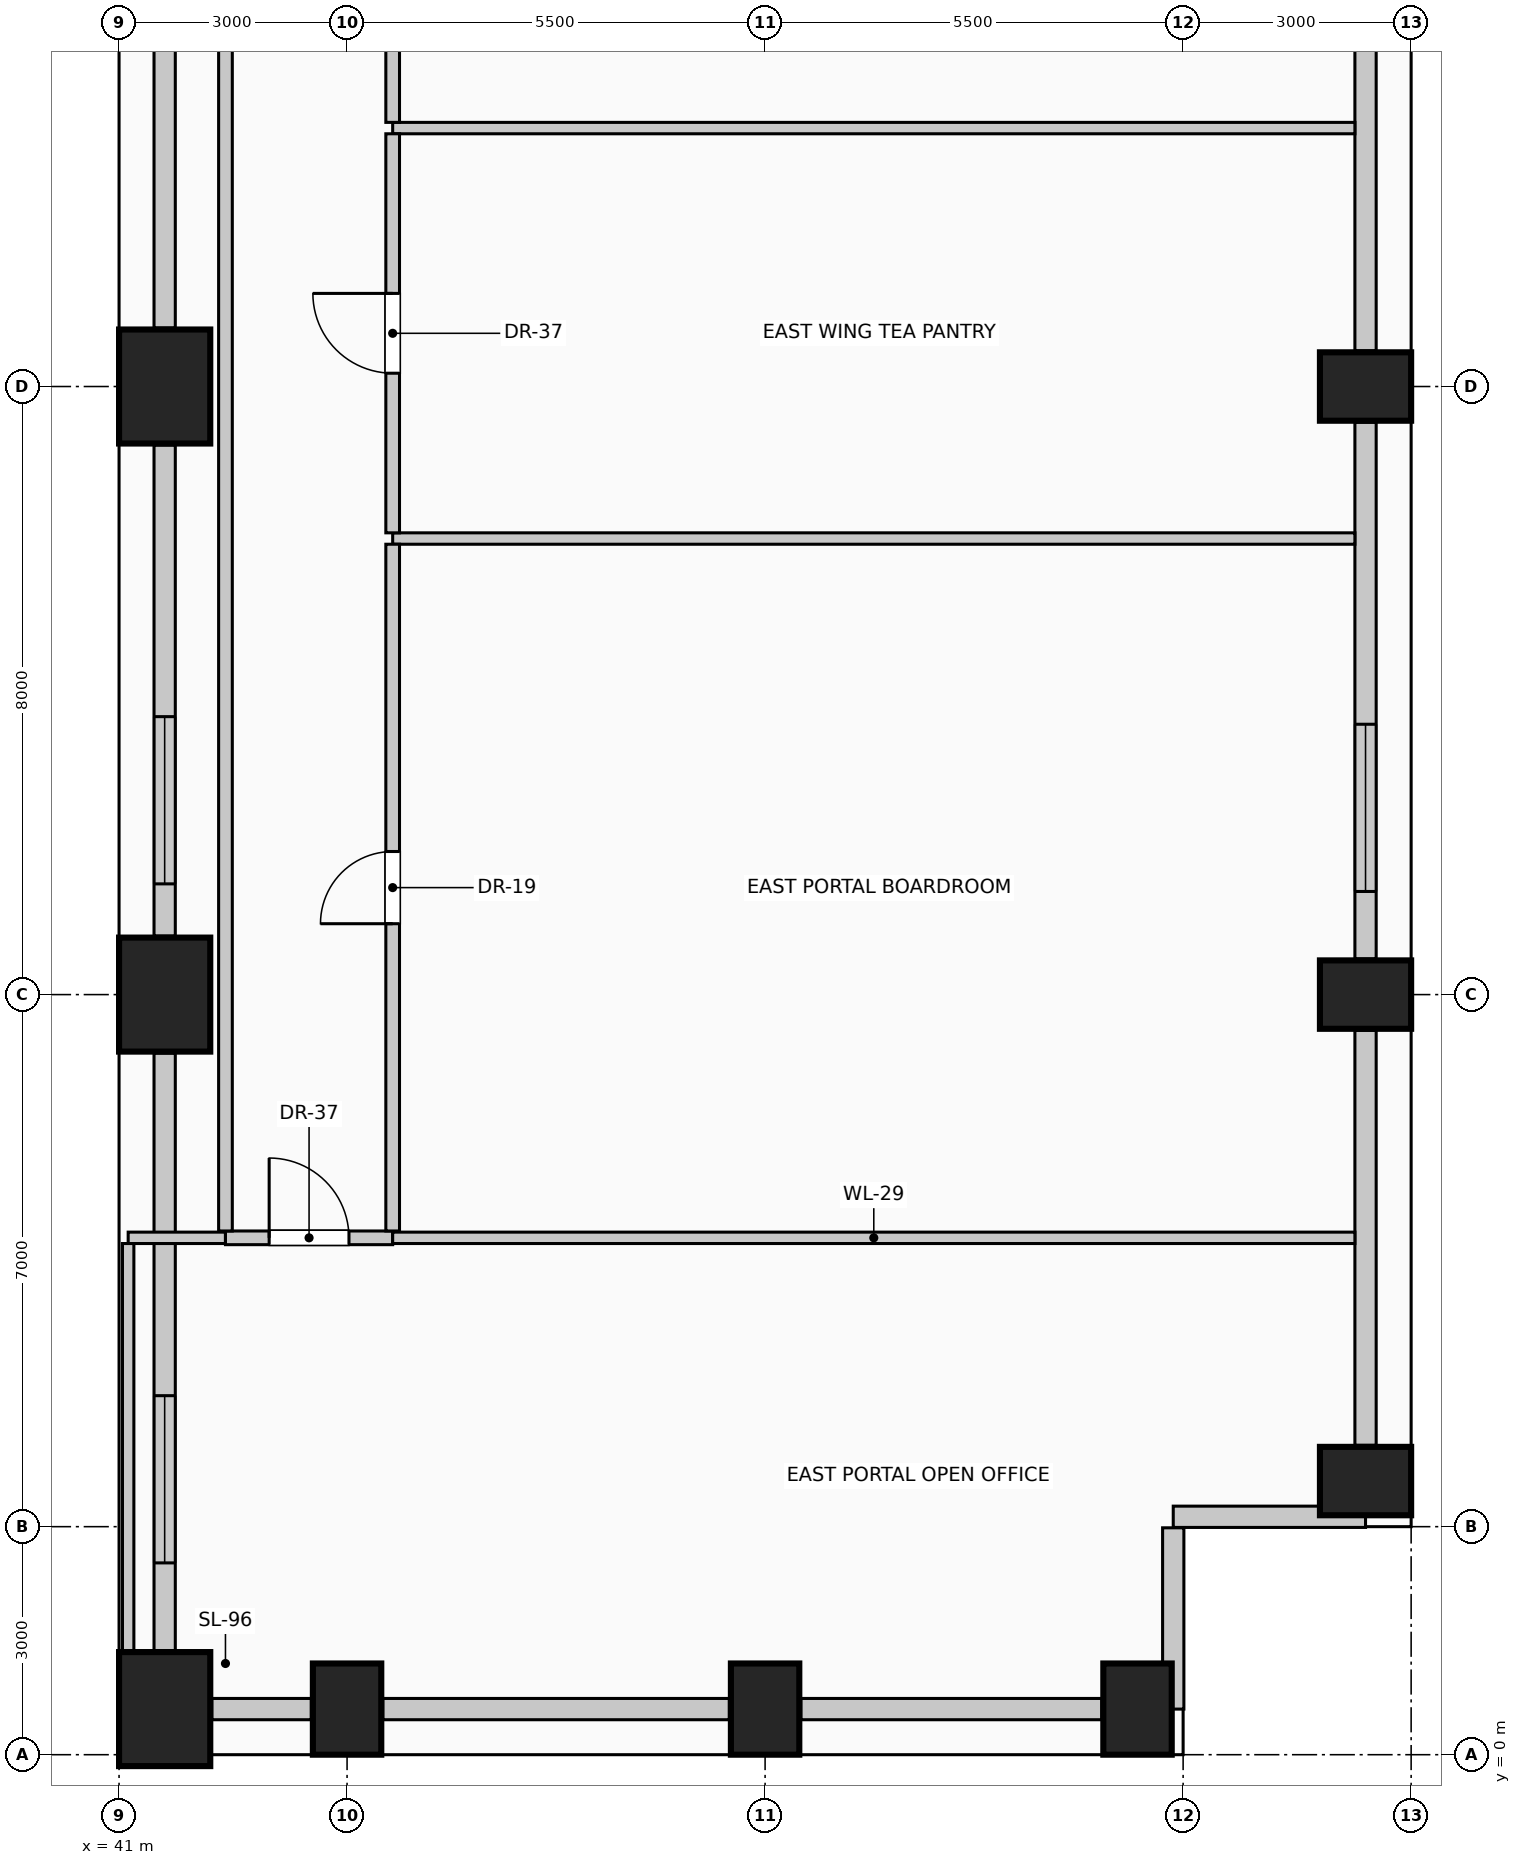
"""IFC4 building model, lengths in metres.
Left out: names, types, materials, properties, quantities, classifications, styles, units other than length and angle.
Written with IfcOpenShell. Run it as: python <this file> out.ifc"""

import sys

from ifc_helpers import new_model, si_unit, direction, frame, frame_2d, origin, origin_2d, place, context, subcontext, project, spatial, rectangle, extrude, element, fill, save


model = new_model("IFC4")
c1 = context("Model", 3, precision=1e-05, world=origin(), true_north=direction((0.0, 1.0)))
c2 = subcontext(c1, "Body", "Model", "MODEL_VIEW")
j1 = project(units=[si_unit("LENGTHUNIT", "METRE"), si_unit("PLANEANGLEUNIT", "RADIAN")], contexts=[c1])
p1 = place(None, origin())
s1 = spatial("IfcSite", under=j1, at=p1, CompositionType="ELEMENT")
p2 = place(p1, origin())
s2 = spatial("IfcBuilding", under=s1, at=p2, CompositionType="ELEMENT")
p3 = place(p2, frame((0.0, 0.0, 26.6)))
s3 = spatial("IfcBuildingStorey", under=s2, at=p3, CompositionType="ELEMENT", Elevation=26.6)
p4 = place(p3, frame((41.6, 0.6, 0.0), z_axis=(0.0, 0.0, 1.0), x_axis=(1.0, 0.0, 0.0)))
e1 = element("IfcColumn", 1, at=p4, inside=s3, PredefinedType="COLUMN", context=c2, shape_type="SweptSolid", body=[
    extrude(rectangle(XDim=1.2, YDim=1.5, at=origin_2d()), origin(), (0.0, 0.0, 1.0), 4.0),
])
for number, where, z_axis, x_axis in (
    (2, (44.0, 0.6, 0.0), (0.0, 0.0, 1.0), (1.0, 0.0, 0.0)),
    (3, (49.5, 0.6, 0.0), (0.0, 0.0, 1.0), (1.0, 0.0, 0.0)),
    (4, (54.4, 0.6, 0.0), (0.0, 0.0, 1.0), (1.0, 0.0, 0.0)),
    (5, (57.4, 3.6, 0.0), (0.0, 0.0, 1.0), (0.0, 1.0, 0.0)),
    (6, (57.4, 10.0, 0.0), (0.0, 0.0, 1.0), (0.0, 1.0, 0.0)),
    (7, (57.4, 18.0, 0.0), (0.0, 0.0, 1.0), (0.0, 1.0, 0.0)),
):
    element("IfcColumn", number, at=place(p3, frame(where, z_axis=z_axis, x_axis=x_axis)), inside=s3, PredefinedType="COLUMN", context=c2, shape_type="SweptSolid", body=[
        extrude(rectangle(XDim=0.9, YDim=1.2, at=origin_2d()), origin(), (0.0, 0.0, 1.0), 4.0),
    ])
for number, where, z_axis, x_axis in (
    (8, (41.6, 10.0, 0.0), (0.0, 0.0, 1.0), (1.0, 0.0, 0.0)),
    (9, (41.6, 18.0, 0.0), (0.0, 0.0, 1.0), (1.0, 0.0, 0.0)),
):
    element("IfcColumn", number, at=place(p3, frame(where, z_axis=z_axis, x_axis=x_axis)), inside=s3, PredefinedType="COLUMN", context=c2, shape_type="SweptSolid", body=[
        extrude(rectangle(XDim=1.2, YDim=1.5, at=origin_2d()), origin(), (0.0, 0.0, 1.0), 4.0),
    ])
p5 = place(p3, frame((43.53, 0.6, 0.0), z_axis=(0.0, 0.0, 1.0), x_axis=(-1.0, 0.0, 0.0)))
e10 = element("IfcWall", 10, at=p5, inside=s3, PredefinedType="SOLIDWALL", context=c2, shape_type="SweptSolid", body=[
    extrude(rectangle(XDim=1.31, YDim=0.28, at=frame_2d((0.655, 0.0))), origin(), (0.0, 0.0, 1.0), 2.85),
])
p6 = place(p3, frame((49.03, 0.6, 0.0), z_axis=(0.0, 0.0, 1.0), x_axis=(-1.0, 0.0, 0.0)))
e11 = element("IfcWall", 11, at=p6, inside=s3, PredefinedType="SOLIDWALL", context=c2, shape_type="SweptSolid", body=[
    extrude(rectangle(XDim=4.56, YDim=0.28, at=frame_2d((2.28, 0.0))), origin(), (0.0, 0.0, 1.0), 2.85),
])
p7 = place(p3, frame((53.93, 0.6, 0.0), z_axis=(0.0, 0.0, 1.0), x_axis=(-1.0, 0.0, 0.0)))
e12 = element("IfcWall", 12, at=p7, inside=s3, PredefinedType="SOLIDWALL", context=c2, shape_type="SweptSolid", body=[
    extrude(rectangle(XDim=3.96, YDim=0.28, at=frame_2d((1.98, 0.0))), origin(), (0.0, 0.0, 1.0), 2.85),
])
p8 = place(p3, frame((57.4, 9.53, 0.0), z_axis=(0.0, 0.0, 1.0), x_axis=(0.0, -1.0, 0.0)))
e13 = element("IfcWall", 13, at=p8, inside=s3, PredefinedType="SOLIDWALL", context=c2, shape_type="SweptSolid", body=[
    extrude(rectangle(XDim=5.46, YDim=0.28, at=frame_2d((2.73, 0.0))), origin(), (0.0, 0.0, 1.0), 2.85),
])
p9 = place(p3, frame((57.4, 17.53, 0.0), z_axis=(0.0, 0.0, 1.0), x_axis=(0.0, -1.0, 0.0)))
e14 = element("IfcWall", 14, at=p9, inside=s3, PredefinedType="SOLIDWALL", context=c2, shape_type="SweptSolid", body=[
    extrude(rectangle(XDim=7.06, YDim=0.28, at=frame_2d((3.53, 0.0))), origin(), (0.0, 0.0, 1.0), 2.85),
])
p10 = place(p9, frame((3.973, 0.0, 0.42)))
e15 = element("IfcOpeningElement", 15, at=p10, cuts=e14, PredefinedType="OPENING", context=c2, shape_type="SweptSolid", body=[
    extrude(rectangle(XDim=2.2, YDim=1.95, at=frame_2d((1.1, 0.975))), frame((0.0, 0.15, 0.0), z_axis=(0.0, -1.0, 0.0), x_axis=(1.0, 0.0, 0.0)), (0.0, 0.0, 1.0), 0.3),
])
p11 = place(p3, frame((57.4, 25.53, 0.0), z_axis=(0.0, 0.0, 1.0), x_axis=(0.0, -1.0, 0.0)))
e16 = element("IfcWall", 16, at=p11, inside=s3, PredefinedType="SOLIDWALL", context=c2, shape_type="SweptSolid", body=[
    extrude(rectangle(XDim=7.06, YDim=0.28, at=frame_2d((3.53, 0.0))), origin(), (0.0, 0.0, 1.0), 2.85),
])
p12 = place(p3, frame((57.4, 3.13, 0.0), z_axis=(0.0, 0.0, 1.0), x_axis=(-1.0, 0.0, 0.0)))
e17 = element("IfcWall", 17, at=p12, inside=s3, PredefinedType="SOLIDWALL", context=c2, shape_type="SweptSolid", body=[
    extrude(rectangle(XDim=2.53, YDim=0.28, at=frame_2d((1.265, 0.0))), origin(), (0.0, 0.0, 1.0), 3.7),
])
p13 = place(p3, frame((54.87, 2.985, 0.0), z_axis=(0.0, 0.0, 1.0), x_axis=(0.0, -1.0, 0.0)))
e18 = element("IfcWall", 18, at=p13, inside=s3, PredefinedType="SOLIDWALL", context=c2, shape_type="SweptSolid", body=[
    extrude(rectangle(XDim=2.385, YDim=0.28, at=frame_2d((1.192, 0.0))), origin(), (0.0, 0.0, 1.0), 3.7),
])
p14 = place(p3, frame((41.6, 1.37, 0.0), z_axis=(0.0, 0.0, 1.0), x_axis=(0.0, 1.0, 0.0)))
e19 = element("IfcWall", 19, at=p14, inside=s3, PredefinedType="SOLIDWALL", context=c2, shape_type="SweptSolid", body=[
    extrude(rectangle(XDim=7.86, YDim=0.28, at=frame_2d((3.93, 0.0))), origin(), (0.0, 0.0, 1.0), 3.0),
])
p15 = place(p14, frame((1.153, 0.0, 0.42)))
e20 = element("IfcOpeningElement", 20, at=p15, cuts=e19, PredefinedType="OPENING", context=c2, shape_type="SweptSolid", body=[
    extrude(rectangle(XDim=2.2, YDim=1.95, at=frame_2d((1.1, 0.975))), frame((0.0, 0.15, 0.0), z_axis=(0.0, -1.0, 0.0), x_axis=(1.0, 0.0, 0.0)), (0.0, 0.0, 1.0), 0.3),
])
p16 = place(p3, frame((41.6, 10.77, 0.0), z_axis=(0.0, 0.0, 1.0), x_axis=(0.0, 1.0, 0.0)))
e21 = element("IfcWall", 21, at=p16, inside=s3, PredefinedType="SOLIDWALL", context=c2, shape_type="SweptSolid", body=[
    extrude(rectangle(XDim=6.46, YDim=0.28, at=frame_2d((3.23, 0.0))), origin(), (0.0, 0.0, 1.0), 3.0),
])
p17 = place(p16, frame((0.687, 0.0, 0.42)))
e22 = element("IfcOpeningElement", 22, at=p17, cuts=e21, PredefinedType="OPENING", context=c2, shape_type="SweptSolid", body=[
    extrude(rectangle(XDim=2.2, YDim=1.95, at=frame_2d((1.1, 0.975))), frame((0.0, 0.15, 0.0), z_axis=(0.0, -1.0, 0.0), x_axis=(1.0, 0.0, 0.0)), (0.0, 0.0, 1.0), 0.3),
])
p18 = place(p3, frame((41.6, 18.77, 0.0), z_axis=(0.0, 0.0, 1.0), x_axis=(0.0, 1.0, 0.0)))
e23 = element("IfcWall", 23, at=p18, inside=s3, PredefinedType="SOLIDWALL", context=c2, shape_type="SweptSolid", body=[
    extrude(rectangle(XDim=6.46, YDim=0.28, at=frame_2d((3.23, 0.0))), origin(), (0.0, 0.0, 1.0), 3.0),
])
p19 = place(p3, frame((41.12, 6.8, 0.0), z_axis=(0.0, 0.0, 1.0), x_axis=(1.0, 0.0, 0.0)))
e24 = element("IfcWall", 24, at=p19, inside=s3, PredefinedType="PARTITIONING", context=c2, shape_type="SweptSolid", body=[
    extrude(rectangle(XDim=1.28, YDim=0.15, at=frame_2d((0.64, 0.0))), origin(), (0.0, 0.0, 1.0), 3.095),
])
p20 = place(p3, frame((42.4, 6.8, 0.0), z_axis=(0.0, 0.0, 1.0), x_axis=(1.0, 0.0, 0.0)))
e25 = element("IfcWall", 25, at=p20, inside=s3, PredefinedType="PARTITIONING", context=c2, shape_type="SweptSolid", body=[
    extrude(rectangle(XDim=2.2, YDim=0.18, at=frame_2d((1.1, 0.0))), origin(), (0.0, 0.0, 1.0), 3.095),
])
p21 = place(p20, frame((0.575, 0.0, 0.0)))
e26 = element("IfcOpeningElement", 26, at=p21, cuts=e25, PredefinedType="OPENING", context=c2, shape_type="SweptSolid", body=[
    extrude(rectangle(XDim=1.05, YDim=2.15, at=frame_2d((0.525, 1.075))), frame((0.0, 0.1, 0.0), z_axis=(0.0, -1.0, 0.0), x_axis=(1.0, 0.0, 0.0)), (0.0, 0.0, 1.0), 0.2),
])
p22 = place(p3, frame((44.6, 6.8, 0.0), z_axis=(0.0, 0.0, 1.0), x_axis=(1.0, 0.0, 0.0)))
e27 = element("IfcWall", 27, at=p22, inside=s3, PredefinedType="PARTITIONING", context=c2, shape_type="SweptSolid", body=[
    extrude(rectangle(XDim=12.66, YDim=0.15, at=frame_2d((6.33, 0.0))), origin(), (0.0, 0.0, 1.0), 3.095),
])
for number, where, z_axis, x_axis in (
    (28, (44.6, 16.0, 0.0), (0.0, 0.0, 1.0), (1.0, 0.0, 0.0)),
    (29, (44.6, 21.4, 0.0), (0.0, 0.0, 1.0), (1.0, 0.0, 0.0)),
):
    element("IfcWall", number, at=place(p3, frame(where, z_axis=z_axis, x_axis=x_axis)), inside=s3, PredefinedType="PARTITIONING", context=c2, shape_type="SweptSolid", body=[
        extrude(rectangle(XDim=12.66, YDim=0.15, at=frame_2d((6.33, 0.0))), origin(), (0.0, 0.0, 1.0), 3.7),
    ])
p23 = place(p3, frame((41.12, 1.35, 0.0), z_axis=(0.0, 0.0, 1.0), x_axis=(0.0, 1.0, 0.0)))
e30 = element("IfcWall", 30, at=p23, inside=s3, PredefinedType="PARTITIONING", context=c2, shape_type="SweptSolid", body=[
    extrude(rectangle(XDim=5.375, YDim=0.15, at=frame_2d((2.688, 0.0))), origin(), (0.0, 0.0, 1.0), 3.7),
])
p24 = place(p3, frame((42.4, 6.89, 0.0), z_axis=(0.0, 0.0, 1.0), x_axis=(0.0, 1.0, 0.0)))
e31 = element("IfcWall", 31, at=p24, inside=s3, PredefinedType="PARTITIONING", context=c2, shape_type="SweptSolid", body=[
    extrude(rectangle(XDim=25.385, YDim=0.18, at=frame_2d((12.692, 0.0))), origin(), (0.0, 0.0, 1.0), 3.7),
])
p25 = place(p3, frame((44.6, 6.89, 0.0), z_axis=(0.0, 0.0, 1.0), x_axis=(0.0, 1.0, 0.0)))
e32 = element("IfcWall", 32, at=p25, inside=s3, PredefinedType="PARTITIONING", context=c2, shape_type="SweptSolid", body=[
    extrude(rectangle(XDim=9.035, YDim=0.18, at=frame_2d((4.518, 0.0))), origin(), (0.0, 0.0, 1.0), 3.7),
])
p26 = place(p25, frame((4.042, 0.0, 0.0)))
e33 = element("IfcOpeningElement", 33, at=p26, cuts=e32, PredefinedType="OPENING", context=c2, shape_type="SweptSolid", body=[
    extrude(rectangle(XDim=0.95, YDim=2.15, at=frame_2d((0.475, 1.075))), frame((0.0, 0.1, 0.0), z_axis=(0.0, -1.0, 0.0), x_axis=(1.0, 0.0, 0.0)), (0.0, 0.0, 1.0), 0.2),
])
p27 = place(p3, frame((44.6, 16.075, 0.0), z_axis=(0.0, 0.0, 1.0), x_axis=(0.0, 1.0, 0.0)))
e34 = element("IfcWall", 34, at=p27, inside=s3, PredefinedType="PARTITIONING", context=c2, shape_type="SweptSolid", body=[
    extrude(rectangle(XDim=5.25, YDim=0.18, at=frame_2d((2.625, 0.0))), origin(), (0.0, 0.0, 1.0), 3.7),
])
p28 = place(p27, frame((2.1, 0.0, 0.0)))
e35 = element("IfcOpeningElement", 35, at=p28, cuts=e34, PredefinedType="OPENING", context=c2, shape_type="SweptSolid", body=[
    extrude(rectangle(XDim=1.05, YDim=2.15, at=frame_2d((0.525, 1.075))), frame((0.0, 0.1, 0.0), z_axis=(0.0, -1.0, 0.0), x_axis=(1.0, 0.0, 0.0)), (0.0, 0.0, 1.0), 0.2),
])
p29 = place(p3, frame((44.6, 21.475, 0.0), z_axis=(0.0, 0.0, 1.0), x_axis=(0.0, 1.0, 0.0)))
e36 = element("IfcWall", 36, at=p29, inside=s3, PredefinedType="PARTITIONING", context=c2, shape_type="SweptSolid", body=[
    extrude(rectangle(XDim=5.25, YDim=0.18, at=frame_2d((2.625, 0.0))), origin(), (0.0, 0.0, 1.0), 3.7),
])
p30 = place(p29, frame((2.15, 0.0, 0.0)))
e37 = element("IfcOpeningElement", 37, at=p30, cuts=e36, PredefinedType="OPENING", context=c2, shape_type="SweptSolid", body=[
    extrude(rectangle(XDim=0.95, YDim=2.15, at=frame_2d((0.475, 1.075))), frame((0.0, 0.1, 0.0), z_axis=(0.0, -1.0, 0.0), x_axis=(1.0, 0.0, 0.0)), (0.0, 0.0, 1.0), 0.2),
])
p31 = place(p10, origin())
e38 = element("IfcWindow", 38, at=p31, inside=s3, PartitioningType="SINGLE_PANEL", PredefinedType="WINDOW", context=c2, shape_type="SweptSolid", body=[
    extrude(rectangle(XDim=2.2, YDim=1.95, at=frame_2d((1.1, 0.975))), frame((0.0, 0.03, 0.0), z_axis=(0.0, -1.0, 0.0), x_axis=(1.0, 0.0, 0.0)), (0.0, 0.0, 1.0), 0.06),
])
fill(e15, e38)
p32 = place(p15, origin())
e39 = element("IfcWindow", 39, at=p32, inside=s3, PartitioningType="SINGLE_PANEL", PredefinedType="WINDOW", context=c2, shape_type="SweptSolid", body=[
    extrude(rectangle(XDim=2.2, YDim=1.95, at=frame_2d((1.1, 0.975))), frame((0.0, 0.03, 0.0), z_axis=(0.0, -1.0, 0.0), x_axis=(1.0, 0.0, 0.0)), (0.0, 0.0, 1.0), 0.06),
])
fill(e20, e39)
p33 = place(p17, origin())
e40 = element("IfcWindow", 40, at=p33, inside=s3, PartitioningType="SINGLE_PANEL", PredefinedType="WINDOW", context=c2, shape_type="SweptSolid", body=[
    extrude(rectangle(XDim=2.2, YDim=1.95, at=frame_2d((1.1, 0.975))), frame((0.0, 0.03, 0.0), z_axis=(0.0, -1.0, 0.0), x_axis=(1.0, 0.0, 0.0)), (0.0, 0.0, 1.0), 0.06),
])
fill(e22, e40)
p34 = place(p21, origin())
e41 = element("IfcDoor", 41, at=p34, inside=s3, OperationType="SINGLE_SWING_LEFT", PredefinedType="DOOR", context=c2, shape_type="SweptSolid", body=[
    extrude(rectangle(XDim=1.05, YDim=2.15, at=frame_2d((0.525, 1.075))), frame((0.0, 0.025, 0.0), z_axis=(0.0, -1.0, 0.0), x_axis=(1.0, 0.0, 0.0)), (0.0, 0.0, 1.0), 0.05),
])
fill(e26, e41)
p35 = place(p26, origin())
e42 = element("IfcDoor", 42, at=p35, inside=s3, OperationType="SINGLE_SWING_LEFT", PredefinedType="DOOR", context=c2, shape_type="SweptSolid", body=[
    extrude(rectangle(XDim=0.95, YDim=2.15, at=frame_2d((0.475, 1.075))), frame((0.0, 0.025, 0.0), z_axis=(0.0, -1.0, 0.0), x_axis=(1.0, 0.0, 0.0)), (0.0, 0.0, 1.0), 0.05),
])
fill(e33, e42)
p36 = place(p28, origin())
e43 = element("IfcDoor", 43, at=p36, inside=s3, OperationType="SINGLE_SWING_RIGHT", PredefinedType="DOOR", context=c2, shape_type="SweptSolid", body=[
    extrude(rectangle(XDim=1.05, YDim=2.15, at=frame_2d((0.525, 1.075))), frame((0.0, 0.025, 0.0), z_axis=(0.0, -1.0, 0.0), x_axis=(1.0, 0.0, 0.0)), (0.0, 0.0, 1.0), 0.05),
])
fill(e35, e43)
save(model, sys.argv[1])
